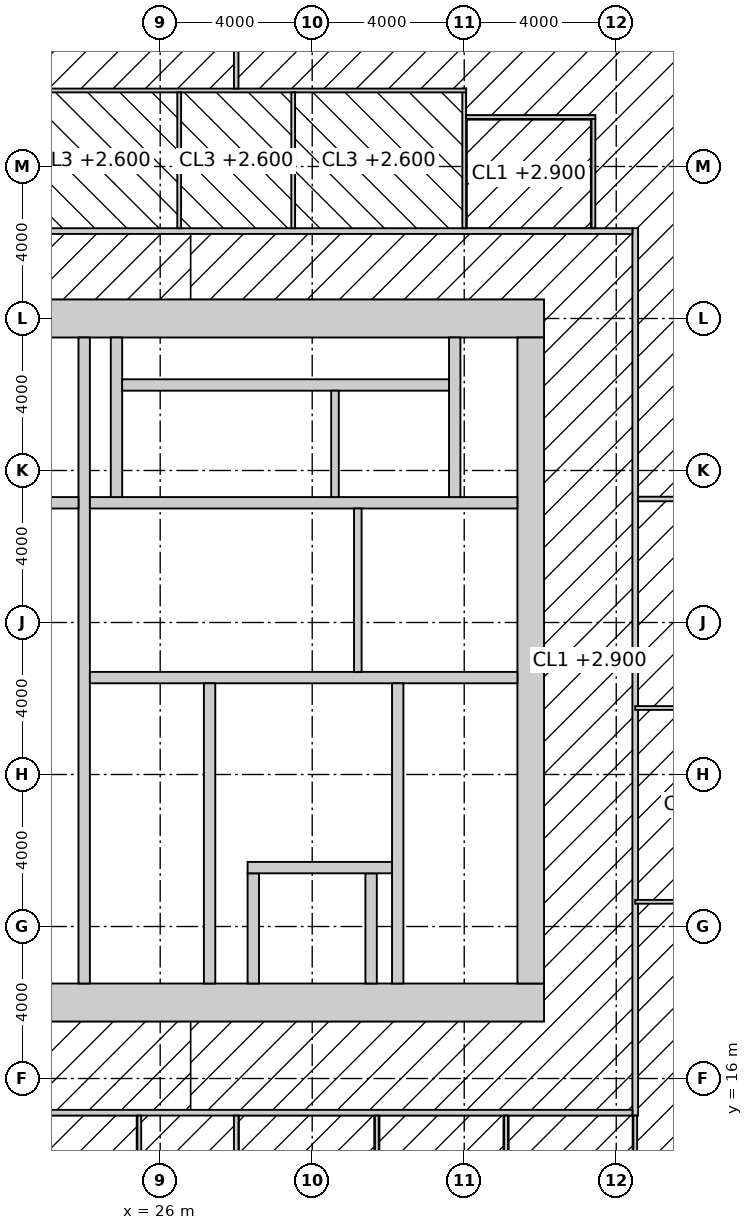
"""IFC4 building model, lengths in metres.
Left out: names, types, materials, properties, quantities, classifications, styles, units other than length and angle.
Written with IfcOpenShell. Run it as: python <this file> out.ifc"""

import sys

from ifc_helpers import new_model, si_unit, direction, frame, frame_2d, origin, place, context, subcontext, project, spatial, rectangle, extrude, element, fill, save


model = new_model("IFC4")
c1 = context("Model", 3, precision=1e-05, world=origin(), true_north=direction((0.0, 1.0)))
c2 = subcontext(c1, "Body", "Model", "MODEL_VIEW")
j1 = project(units=[si_unit("LENGTHUNIT", "METRE"), si_unit("PLANEANGLEUNIT", "RADIAN")], contexts=[c1])
p1 = place(None, origin())
s1 = spatial("IfcSite", under=j1, at=p1, CompositionType="ELEMENT")
p2 = place(p1, origin())
s2 = spatial("IfcBuilding", under=s1, at=p2, CompositionType="ELEMENT")
p3 = place(p2, frame((0.0, 0.0, 254.2)))
s3 = spatial("IfcBuildingStorey", under=s2, at=p3, CompositionType="ELEMENT", Elevation=254.2)
p4 = place(p3, frame((18.5, 18.0, -0.15), z_axis=(0.0, 0.0, 1.0), x_axis=(1.0, 0.0, 0.0)))
e1 = element("IfcWall", 1, at=p4, inside=s3, PredefinedType="SHEAR", context=c2, shape_type="SweptSolid", body=[
    extrude(rectangle(XDim=17.6, YDim=1.0, at=frame_2d((8.8, 0.0))), origin(), (0.0, 0.0, 1.0), 4.0),
])
p5 = place(p4, frame((3.45, 0.0, 0.15)))
e2 = element("IfcOpeningElement", 2, at=p5, cuts=e1, PredefinedType="OPENING", context=c2, shape_type="SweptSolid", body=[
    extrude(rectangle(XDim=1.5, YDim=2.4, at=frame_2d((0.75, 1.2))), frame((0.0, 0.51, 0.0), z_axis=(0.0, -1.0, 0.0), x_axis=(1.0, 0.0, 0.0)), (0.0, 0.0, 1.0), 1.02),
])
p6 = place(p3, frame((18.5, 36.0, -0.15), z_axis=(0.0, 0.0, 1.0), x_axis=(1.0, 0.0, 0.0)))
e3 = element("IfcWall", 3, at=p6, inside=s3, PredefinedType="SHEAR", context=c2, shape_type="SweptSolid", body=[
    extrude(rectangle(XDim=17.6, YDim=1.0, at=frame_2d((8.8, 0.0))), origin(), (0.0, 0.0, 1.0), 4.0),
])
p7 = place(p3, frame((35.75, 18.5, -0.15), z_axis=(0.0, 0.0, 1.0), x_axis=(0.0, 1.0, 0.0)))
e4 = element("IfcWall", 4, at=p7, inside=s3, PredefinedType="SHEAR", context=c2, shape_type="SweptSolid", body=[
    extrude(rectangle(XDim=17.0, YDim=0.7, at=frame_2d((8.5, 0.0))), origin(), (0.0, 0.0, 1.0), 4.0),
])
p8 = place(p7, frame((9.85, 0.0, 0.15)))
e5 = element("IfcOpeningElement", 5, at=p8, cuts=e4, PredefinedType="OPENING", context=c2, shape_type="SweptSolid", body=[
    extrude(rectangle(XDim=1.0, YDim=2.2, at=frame_2d((0.5, 1.1))), frame((0.0, 0.36, 0.0), z_axis=(0.0, -1.0, 0.0), x_axis=(1.0, 0.0, 0.0)), (0.0, 0.0, 1.0), 0.72),
])
p9 = place(p3, frame((24.0, 18.5, -0.15), z_axis=(0.0, 0.0, 1.0), x_axis=(0.0, 1.0, 0.0)))
e6 = element("IfcWall", 6, at=p9, inside=s3, PredefinedType="SHEAR", context=c2, shape_type="SweptSolid", body=[
    extrude(rectangle(XDim=17.0, YDim=0.3, at=frame_2d((8.5, 0.0))), origin(), (0.0, 0.0, 1.0), 4.0),
])
p10 = place(p9, frame((9.6, 0.0, 0.15)))
e7 = element("IfcOpeningElement", 7, at=p10, cuts=e6, PredefinedType="OPENING", context=c2, shape_type="SweptSolid", body=[
    extrude(rectangle(XDim=1.5, YDim=2.4, at=frame_2d((0.75, 1.2))), frame((0.0, 0.16, 0.0), z_axis=(0.0, -1.0, 0.0), x_axis=(1.0, 0.0, 0.0)), (0.0, 0.0, 1.0), 0.32),
])
p11 = place(p3, frame((24.15, 26.55, -0.15), z_axis=(0.0, 0.0, 1.0), x_axis=(1.0, 0.0, 0.0)))
e8 = element("IfcWall", 8, at=p11, inside=s3, PredefinedType="SHEAR", context=c2, shape_type="SweptSolid", body=[
    extrude(rectangle(XDim=11.25, YDim=0.3, at=frame_2d((5.625, 0.0))), origin(), (0.0, 0.0, 1.0), 4.0),
])
p12 = place(p11, frame((9.25, 0.0, 0.15)))
e9 = element("IfcOpeningElement", 9, at=p12, cuts=e8, PredefinedType="OPENING", context=c2, shape_type="SweptSolid", body=[
    extrude(rectangle(XDim=1.0, YDim=2.2, at=frame_2d((0.5, 1.1))), frame((0.0, 0.16, 0.0), z_axis=(0.0, -1.0, 0.0), x_axis=(1.0, 0.0, 0.0)), (0.0, 0.0, 1.0), 0.32),
])
p13 = place(p11, frame((4.9, 0.0, 0.15)))
e10 = element("IfcOpeningElement", 10, at=p13, cuts=e8, PredefinedType="OPENING", context=c2, shape_type="SweptSolid", body=[
    extrude(rectangle(XDim=1.5, YDim=2.4, at=frame_2d((0.75, 1.2))), frame((0.0, 0.16, 0.0), z_axis=(0.0, -1.0, 0.0), x_axis=(1.0, 0.0, 0.0)), (0.0, 0.0, 1.0), 0.32),
])
p14 = place(p3, frame((27.3, 18.5, -0.15), z_axis=(0.0, 0.0, 1.0), x_axis=(0.0, 1.0, 0.0)))
e11 = element("IfcWall", 11, at=p14, inside=s3, PredefinedType="SHEAR", context=c2, shape_type="SweptSolid", body=[
    extrude(rectangle(XDim=7.9, YDim=0.3, at=frame_2d((3.95, 0.0))), origin(), (0.0, 0.0, 1.0), 4.0),
])
p15 = place(p14, frame((6.4, 0.0, 0.15)))
e12 = element("IfcOpeningElement", 12, at=p15, cuts=e11, PredefinedType="OPENING", context=c2, shape_type="SweptSolid", body=[
    extrude(rectangle(XDim=1.0, YDim=2.2, at=frame_2d((0.5, 1.1))), frame((0.0, 0.16, 0.0), z_axis=(0.0, -1.0, 0.0), x_axis=(1.0, 0.0, 0.0)), (0.0, 0.0, 1.0), 0.32),
])
p16 = place(p3, frame((32.25, 18.5, -0.15), z_axis=(0.0, 0.0, 1.0), x_axis=(0.0, 1.0, 0.0)))
e13 = element("IfcWall", 13, at=p16, inside=s3, PredefinedType="SHEAR", context=c2, shape_type="SweptSolid", body=[
    extrude(rectangle(XDim=7.9, YDim=0.3, at=frame_2d((3.95, 0.0))), origin(), (0.0, 0.0, 1.0), 4.0),
])
for number, where, z_axis, x_axis in (
    (14, (28.45, 18.5, -0.15), (0.0, 0.0, 1.0), (0.0, 1.0, 0.0)),
    (15, (31.55, 18.5, -0.15), (0.0, 0.0, 1.0), (0.0, 1.0, 0.0)),
):
    element("IfcWall", number, at=place(p3, frame(where, z_axis=z_axis, x_axis=x_axis)), inside=s3, PredefinedType="SHEAR", context=c2, shape_type="SweptSolid", body=[
        extrude(rectangle(XDim=2.9, YDim=0.3, at=frame_2d((1.45, 0.0))), origin(), (0.0, 0.0, 1.0), 4.0),
    ])
p17 = place(p3, frame((28.3, 21.55, -0.15), z_axis=(0.0, 0.0, 1.0), x_axis=(1.0, 0.0, 0.0)))
e16 = element("IfcWall", 16, at=p17, inside=s3, PredefinedType="SHEAR", context=c2, shape_type="SweptSolid", body=[
    extrude(rectangle(XDim=3.8, YDim=0.3, at=frame_2d((1.9, 0.0))), origin(), (0.0, 0.0, 1.0), 4.0),
])
p18 = place(p17, frame((1.05, 0.0, 0.15)))
e17 = element("IfcOpeningElement", 17, at=p18, cuts=e16, PredefinedType="OPENING", context=c2, shape_type="SweptSolid", body=[
    extrude(rectangle(XDim=1.3, YDim=2.4, at=frame_2d((0.65, 1.2))), frame((0.0, 0.16, 0.0), z_axis=(0.0, -1.0, 0.0), x_axis=(1.0, 0.0, 0.0)), (0.0, 0.0, 1.0), 0.32),
])
p19 = place(p3, frame((24.15, 31.15, -0.15), z_axis=(0.0, 0.0, 1.0), x_axis=(1.0, 0.0, 0.0)))
e18 = element("IfcWall", 18, at=p19, inside=s3, PredefinedType="SHEAR", context=c2, shape_type="SweptSolid", body=[
    extrude(rectangle(XDim=11.25, YDim=0.3, at=frame_2d((5.625, 0.0))), origin(), (0.0, 0.0, 1.0), 4.0),
])
p20 = place(p19, frame((3.15, 0.0, 0.15)))
e19 = element("IfcOpeningElement", 19, at=p20, cuts=e18, PredefinedType="OPENING", context=c2, shape_type="SweptSolid", body=[
    extrude(rectangle(XDim=1.0, YDim=2.2, at=frame_2d((0.5, 1.1))), frame((0.0, 0.16, 0.0), z_axis=(0.0, -1.0, 0.0), x_axis=(1.0, 0.0, 0.0)), (0.0, 0.0, 1.0), 0.32),
])
p21 = place(p19, frame((7.25, 0.0, 0.15)))
e20 = element("IfcOpeningElement", 20, at=p21, cuts=e18, PredefinedType="OPENING", context=c2, shape_type="SweptSolid", body=[
    extrude(rectangle(XDim=1.4, YDim=2.4, at=frame_2d((0.7, 1.2))), frame((0.0, 0.16, 0.0), z_axis=(0.0, -1.0, 0.0), x_axis=(1.0, 0.0, 0.0)), (0.0, 0.0, 1.0), 0.32),
])
p22 = place(p3, frame((18.5, 31.15, -0.15), z_axis=(0.0, 0.0, 1.0), x_axis=(1.0, 0.0, 0.0)))
e21 = element("IfcWall", 21, at=p22, inside=s3, PredefinedType="SHEAR", context=c2, shape_type="SweptSolid", body=[
    extrude(rectangle(XDim=5.35, YDim=0.3, at=frame_2d((2.675, 0.0))), origin(), (0.0, 0.0, 1.0), 4.0),
])
p23 = place(p22, frame((3.4, 0.0, 0.15)))
e22 = element("IfcOpeningElement", 22, at=p23, cuts=e21, PredefinedType="OPENING", context=c2, shape_type="SweptSolid", body=[
    extrude(rectangle(XDim=1.0, YDim=2.2, at=frame_2d((0.5, 1.1))), frame((0.0, 0.16, 0.0), z_axis=(0.0, -1.0, 0.0), x_axis=(1.0, 0.0, 0.0)), (0.0, 0.0, 1.0), 0.32),
])
for number, where, z_axis, x_axis in (
    (23, (24.85, 31.3, -0.15), (0.0, 0.0, 1.0), (0.0, 1.0, 0.0)),
    (24, (33.75, 31.3, -0.15), (0.0, 0.0, 1.0), (0.0, 1.0, 0.0)),
):
    element("IfcWall", number, at=place(p3, frame(where, z_axis=z_axis, x_axis=x_axis)), inside=s3, PredefinedType="SHEAR", context=c2, shape_type="SweptSolid", body=[
        extrude(rectangle(XDim=4.2, YDim=0.3, at=frame_2d((2.1, 0.0))), origin(), (0.0, 0.0, 1.0), 4.0),
    ])
p24 = place(p3, frame((25.0, 34.25, -0.15), z_axis=(0.0, 0.0, 1.0), x_axis=(1.0, 0.0, 0.0)))
e25 = element("IfcWall", 25, at=p24, inside=s3, PredefinedType="SHEAR", context=c2, shape_type="SweptSolid", body=[
    extrude(rectangle(XDim=8.6, YDim=0.3, at=frame_2d((4.3, 0.0))), origin(), (0.0, 0.0, 1.0), 4.0),
])
p25 = place(p3, frame((30.6, 31.3, -0.15), z_axis=(0.0, 0.0, 1.0), x_axis=(0.0, 1.0, 0.0)))
e26 = element("IfcWall", 26, at=p25, inside=s3, PredefinedType="SOLIDWALL", context=c2, shape_type="SweptSolid", body=[
    extrude(rectangle(XDim=2.8, YDim=0.2, at=frame_2d((1.4, 0.0))), origin(), (0.0, 0.0, 1.0), 4.0),
])
p26 = place(p3, frame((31.2, 26.7, 0.0), z_axis=(0.0, 0.0, 1.0), x_axis=(0.0, 1.0, 0.0)))
e27 = element("IfcWall", 27, at=p26, inside=s3, PredefinedType="SOLIDWALL", context=c2, shape_type="SweptSolid", body=[
    extrude(rectangle(XDim=4.3, YDim=0.2, at=frame_2d((2.15, 0.0))), origin(), (0.0, 0.0, 1.0), 3.85),
])
p27 = place(p3, frame((38.5, 15.025, 0.0), z_axis=(0.0, 0.0, 1.0), x_axis=(0.0, 1.0, 0.0)))
e28 = element("IfcWall", 28, at=p27, inside=s3, PredefinedType="PARTITIONING", context=c2, shape_type="SweptSolid", body=[
    extrude(rectangle(XDim=23.35, YDim=0.15, at=frame_2d((11.675, 0.0))), origin(), (0.0, 0.0, 1.0), 3.85),
])
p28 = place(p27, frame((7.275, 0.0, 0.0)))
e29 = element("IfcOpeningElement", 29, at=p28, cuts=e28, PredefinedType="OPENING", context=c2, shape_type="SweptSolid", body=[
    extrude(rectangle(XDim=1.8, YDim=2.4, at=frame_2d((0.9, 1.2))), frame((0.0, 0.085, 0.0), z_axis=(0.0, -1.0, 0.0), x_axis=(1.0, 0.0, 0.0)), (0.0, 0.0, 1.0), 0.17),
])
p29 = place(p27, frame((18.826, 0.0, 0.0)))
e30 = element("IfcOpeningElement", 30, at=p29, cuts=e28, PredefinedType="OPENING", context=c2, shape_type="SweptSolid", body=[
    extrude(rectangle(XDim=1.8, YDim=2.4, at=frame_2d((0.9, 1.2))), frame((0.0, 0.085, 0.0), z_axis=(0.0, -1.0, 0.0), x_axis=(1.0, 0.0, 0.0)), (0.0, 0.0, 1.0), 0.17),
])
p30 = place(p3, frame((15.775, 15.1, 0.0), z_axis=(0.0, 0.0, 1.0), x_axis=(1.0, 0.0, 0.0)))
e31 = element("IfcWall", 31, at=p30, inside=s3, PredefinedType="PARTITIONING", context=c2, shape_type="SweptSolid", body=[
    extrude(rectangle(XDim=22.65, YDim=0.15, at=frame_2d((11.325, 0.0))), origin(), (0.0, 0.0, 1.0), 3.85),
])
p31 = place(p3, frame((15.775, 38.3, 0.0), z_axis=(0.0, 0.0, 1.0), x_axis=(1.0, 0.0, 0.0)))
e32 = element("IfcWall", 32, at=p31, inside=s3, PredefinedType="PARTITIONING", context=c2, shape_type="SweptSolid", body=[
    extrude(rectangle(XDim=22.65, YDim=0.15, at=frame_2d((11.325, 0.0))), origin(), (0.0, 0.0, 1.0), 3.85),
])
p32 = place(p31, frame((7.975, 0.0, 0.0)))
e33 = element("IfcOpeningElement", 33, at=p32, cuts=e32, PredefinedType="OPENING", context=c2, shape_type="SweptSolid", body=[
    extrude(rectangle(XDim=0.9, YDim=2.1, at=frame_2d((0.45, 1.05))), frame((0.0, 0.085, 0.0), z_axis=(0.0, -1.0, 0.0), x_axis=(1.0, 0.0, 0.0)), (0.0, 0.0, 1.0), 0.17),
])
p33 = place(p31, frame((11.725, 0.0, 0.0)))
e34 = element("IfcOpeningElement", 34, at=p33, cuts=e32, PredefinedType="OPENING", context=c2, shape_type="SweptSolid", body=[
    extrude(rectangle(XDim=1.0, YDim=2.1, at=frame_2d((0.5, 1.05))), frame((0.0, 0.085, 0.0), z_axis=(0.0, -1.0, 0.0), x_axis=(1.0, 0.0, 0.0)), (0.0, 0.0, 1.0), 0.17),
])
p34 = place(p31, frame((15.575, 0.0, 0.0)))
e35 = element("IfcOpeningElement", 35, at=p34, cuts=e32, PredefinedType="OPENING", context=c2, shape_type="SweptSolid", body=[
    extrude(rectangle(XDim=0.9, YDim=2.1, at=frame_2d((0.45, 1.05))), frame((0.0, 0.085, 0.0), z_axis=(0.0, -1.0, 0.0), x_axis=(1.0, 0.0, 0.0)), (0.0, 0.0, 1.0), 0.17),
])
p35 = place(p3, frame((34.0, 38.375, 0.0), z_axis=(0.0, 0.0, 1.0), x_axis=(0.0, 1.0, 0.0)))
e36 = element("IfcWall", 36, at=p35, inside=s3, PredefinedType="PARTITIONING", context=c2, shape_type="SweptSolid", body=[
    extrude(rectangle(XDim=3.675, YDim=0.1, at=frame_2d((1.837, 0.0))), origin(), (0.0, 0.0, 1.0), 2.95),
])
p36 = place(p3, frame((21.95, 42.0, 0.0), z_axis=(0.0, 0.0, 1.0), x_axis=(1.0, 0.0, 0.0)))
e37 = element("IfcWall", 37, at=p36, inside=s3, PredefinedType="PARTITIONING", context=c2, shape_type="SweptSolid", body=[
    extrude(rectangle(XDim=12.1, YDim=0.1, at=frame_2d((6.05, 0.0))), origin(), (0.0, 0.0, 1.0), 3.85),
])
for number, where, z_axis, x_axis in (
    (38, (26.5, 38.375, 0.0), (0.0, 0.0, 1.0), (0.0, 1.0, 0.0)),
    (39, (29.5, 38.375, 0.0), (0.0, 0.0, 1.0), (0.0, 1.0, 0.0)),
):
    element("IfcWall", number, at=place(p3, frame(where, z_axis=z_axis, x_axis=x_axis)), inside=s3, PredefinedType="PARTITIONING", context=c2, shape_type="SweptSolid", body=[
        extrude(rectangle(XDim=3.575, YDim=0.1, at=frame_2d((1.788, 0.0))), origin(), (0.0, 0.0, 1.0), 3.85),
    ])
p37 = place(p3, frame((28.0, 4.3, 0.0), z_axis=(0.0, 0.0, 1.0), x_axis=(0.0, 1.0, 0.0)))
e40 = element("IfcWall", 40, at=p37, inside=s3, PredefinedType="PARTITIONING", context=c2, shape_type="SweptSolid", body=[
    extrude(rectangle(XDim=10.725, YDim=0.12, at=frame_2d((5.362, 0.0))), origin(), (0.0, 0.0, 1.0), 3.85),
])
p38 = place(p3, frame((28.0, 42.05, 0.0), z_axis=(0.0, 0.0, 1.0), x_axis=(0.0, 1.0, 0.0)))
e41 = element("IfcWall", 41, at=p38, inside=s3, PredefinedType="PARTITIONING", context=c2, shape_type="SweptSolid", body=[
    extrude(rectangle(XDim=1.65, YDim=0.12, at=frame_2d((0.825, 0.0))), origin(), (0.0, 0.0, 1.0), 3.85),
])
p39 = place(p3, frame((38.575, 31.25, 0.0), z_axis=(0.0, 0.0, 1.0), x_axis=(1.0, 0.0, 0.0)))
e42 = element("IfcWall", 42, at=p39, inside=s3, PredefinedType="PARTITIONING", context=c2, shape_type="SweptSolid", body=[
    extrude(rectangle(XDim=11.125, YDim=0.12, at=frame_2d((5.562, 0.0))), origin(), (0.0, 0.0, 1.0), 3.85),
])
p40 = place(p3, frame((34.05, 41.3, 0.0), z_axis=(0.0, 0.0, 1.0), x_axis=(1.0, 0.0, 0.0)))
e43 = element("IfcWall", 43, at=p40, inside=s3, PredefinedType="PARTITIONING", context=c2, shape_type="SweptSolid", body=[
    extrude(rectangle(XDim=3.4, YDim=0.1, at=frame_2d((1.7, 0.0))), origin(), (0.0, 0.0, 1.0), 3.85),
])
p41 = place(p40, frame((1.15, 0.0, 0.0)))
e44 = element("IfcOpeningElement", 44, at=p41, cuts=e43, PredefinedType="OPENING", context=c2, shape_type="SweptSolid", body=[
    extrude(rectangle(XDim=1.0, YDim=2.2, at=frame_2d((0.5, 1.1))), frame((0.0, 0.06, 0.0), z_axis=(0.0, -1.0, 0.0), x_axis=(1.0, 0.0, 0.0)), (0.0, 0.0, 1.0), 0.12),
])
for number, where, z_axis, x_axis in (
    (45, (25.45, 11.55, 0.0), (0.0, 0.0, 1.0), (0.0, 1.0, 0.0)),
    (46, (31.701, 11.55, 0.0), (0.0, 0.0, 1.0), (0.0, 1.0, 0.0)),
    (47, (35.101, 11.55, 0.0), (0.0, 0.0, 1.0), (0.0, 1.0, 0.0)),
):
    element("IfcWall", number, at=place(p3, frame(where, z_axis=z_axis, x_axis=x_axis)), inside=s3, PredefinedType="PARTITIONING", context=c2, shape_type="SweptSolid", body=[
        extrude(rectangle(XDim=3.475, YDim=0.1, at=frame_2d((1.737, 0.0))), origin(), (0.0, 0.0, 1.0), 3.85),
    ])
p42 = place(p3, frame((37.4, 38.375, 0.0), z_axis=(0.0, 0.0, 1.0), x_axis=(0.0, 1.0, 0.0)))
e48 = element("IfcWall", 48, at=p42, inside=s3, PredefinedType="PARTITIONING", context=c2, shape_type="SweptSolid", body=[
    extrude(rectangle(XDim=2.875, YDim=0.1, at=frame_2d((1.438, 0.0))), origin(), (0.0, 0.0, 1.0), 3.85),
])
p43 = place(p3, frame((38.5, 11.55, 0.0), z_axis=(0.0, 0.0, 1.0), x_axis=(0.0, 1.0, 0.0)))
e49 = element("IfcWall", 49, at=p43, inside=s3, PredefinedType="PARTITIONING", context=c2, shape_type="SweptSolid", body=[
    extrude(rectangle(XDim=3.475, YDim=0.1, at=frame_2d((1.737, 0.0))), origin(), (0.0, 0.0, 1.0), 3.85),
])
for number, where, z_axis, x_axis in (
    (50, (38.5, 20.65, 0.0), (0.0, 0.0, 1.0), (1.0, 0.0, 0.0)),
    (51, (43.0, 25.75, 0.0), (0.0, 0.0, 1.0), (-1.0, 0.0, 0.0)),
):
    element("IfcWall", number, at=place(p3, frame(where, z_axis=z_axis, x_axis=x_axis)), inside=s3, PredefinedType="PARTITIONING", context=c2, shape_type="SweptSolid", body=[
        extrude(rectangle(XDim=4.5, YDim=0.1, at=frame_2d((2.25, 0.0))), origin(), (0.0, 0.0, 1.0), 3.85),
    ])
p44 = place(p15, origin())
e52 = element("IfcDoor", 52, at=p44, inside=s3, OperationType="SINGLE_SWING_RIGHT", PredefinedType="DOOR", context=c2, shape_type="SweptSolid", body=[
    extrude(rectangle(XDim=1.0, YDim=2.2, at=frame_2d((0.5, 1.1))), frame((0.0, 0.025, 0.0), z_axis=(0.0, -1.0, 0.0), x_axis=(1.0, 0.0, 0.0)), (0.0, 0.0, 1.0), 0.05),
])
fill(e12, e52)
p45 = place(p12, frame((1.0, 0.0, 0.0), z_axis=(0.0, 0.0, 1.0), x_axis=(-1.0, 0.0, 0.0)))
e53 = element("IfcDoor", 53, at=p45, inside=s3, OperationType="SINGLE_SWING_RIGHT", PredefinedType="DOOR", context=c2, shape_type="SweptSolid", body=[
    extrude(rectangle(XDim=1.0, YDim=2.2, at=frame_2d((0.5, 1.1))), frame((0.0, 0.025, 0.0), z_axis=(0.0, -1.0, 0.0), x_axis=(1.0, 0.0, 0.0)), (0.0, 0.0, 1.0), 0.05),
])
fill(e9, e53)
p46 = place(p8, origin())
e54 = element("IfcDoor", 54, at=p46, inside=s3, OperationType="SINGLE_SWING_RIGHT", PredefinedType="DOOR", context=c2, shape_type="SweptSolid", body=[
    extrude(rectangle(XDim=1.0, YDim=2.2, at=frame_2d((0.5, 1.1))), frame((0.0, 0.025, 0.0), z_axis=(0.0, -1.0, 0.0), x_axis=(1.0, 0.0, 0.0)), (0.0, 0.0, 1.0), 0.05),
])
fill(e5, e54)
p47 = place(p13, origin())
e55 = element("IfcDoor", 55, at=p47, inside=s3, OperationType="DOUBLE_DOOR_DOUBLE_SWING", PredefinedType="DOOR", context=c2, shape_type="SweptSolid", body=[
    extrude(rectangle(XDim=1.5, YDim=2.4, at=frame_2d((0.75, 1.2))), frame((0.0, 0.025, 0.0), z_axis=(0.0, -1.0, 0.0), x_axis=(1.0, 0.0, 0.0)), (0.0, 0.0, 1.0), 0.05),
])
fill(e10, e55)
p48 = place(p10, origin())
e56 = element("IfcDoor", 56, at=p48, inside=s3, OperationType="DOUBLE_DOOR_DOUBLE_SWING", PredefinedType="DOOR", context=c2, shape_type="SweptSolid", body=[
    extrude(rectangle(XDim=1.5, YDim=2.4, at=frame_2d((0.75, 1.2))), frame((0.0, 0.025, 0.0), z_axis=(0.0, -1.0, 0.0), x_axis=(1.0, 0.0, 0.0)), (0.0, 0.0, 1.0), 0.05),
])
fill(e7, e56)
p49 = place(p20, origin())
e57 = element("IfcDoor", 57, at=p49, inside=s3, OperationType="SINGLE_SWING_LEFT", PredefinedType="DOOR", context=c2, shape_type="SweptSolid", body=[
    extrude(rectangle(XDim=1.0, YDim=2.2, at=frame_2d((0.5, 1.1))), frame((0.0, 0.025, 0.0), z_axis=(0.0, -1.0, 0.0), x_axis=(1.0, 0.0, 0.0)), (0.0, 0.0, 1.0), 0.05),
])
fill(e19, e57)
p50 = place(p5, origin())
e58 = element("IfcDoor", 58, at=p50, inside=s3, OperationType="DOUBLE_DOOR_DOUBLE_SWING", PredefinedType="DOOR", context=c2, shape_type="SweptSolid", body=[
    extrude(rectangle(XDim=1.5, YDim=2.4, at=frame_2d((0.75, 1.2))), frame((0.0, 0.025, 0.0), z_axis=(0.0, -1.0, 0.0), x_axis=(1.0, 0.0, 0.0)), (0.0, 0.0, 1.0), 0.05),
])
fill(e2, e58)
p51 = place(p32, origin())
e59 = element("IfcDoor", 59, at=p51, inside=s3, OperationType="SINGLE_SWING_LEFT", PredefinedType="DOOR", context=c2, shape_type="SweptSolid", body=[
    extrude(rectangle(XDim=0.9, YDim=2.1, at=frame_2d((0.45, 1.05))), frame((0.0, 0.025, 0.0), z_axis=(0.0, -1.0, 0.0), x_axis=(1.0, 0.0, 0.0)), (0.0, 0.0, 1.0), 0.05),
])
fill(e33, e59)
p52 = place(p33, origin())
e60 = element("IfcDoor", 60, at=p52, inside=s3, OperationType="SLIDING_TO_LEFT", PredefinedType="DOOR", context=c2, shape_type="SweptSolid", body=[
    extrude(rectangle(XDim=1.0, YDim=2.1, at=frame_2d((0.5, 1.05))), frame((0.0, 0.025, 0.0), z_axis=(0.0, -1.0, 0.0), x_axis=(1.0, 0.0, 0.0)), (0.0, 0.0, 1.0), 0.05),
])
fill(e34, e60)
p53 = place(p34, origin())
e61 = element("IfcDoor", 61, at=p53, inside=s3, OperationType="SINGLE_SWING_LEFT", PredefinedType="DOOR", context=c2, shape_type="SweptSolid", body=[
    extrude(rectangle(XDim=0.9, YDim=2.1, at=frame_2d((0.45, 1.05))), frame((0.0, 0.025, 0.0), z_axis=(0.0, -1.0, 0.0), x_axis=(1.0, 0.0, 0.0)), (0.0, 0.0, 1.0), 0.05),
])
fill(e35, e61)
p54 = place(p28, origin())
e62 = element("IfcDoor", 62, at=p54, inside=s3, OperationType="DOUBLE_DOOR_DOUBLE_SWING", PredefinedType="DOOR", context=c2, shape_type="SweptSolid", body=[
    extrude(rectangle(XDim=1.8, YDim=2.4, at=frame_2d((0.9, 1.2))), frame((0.0, 0.025, 0.0), z_axis=(0.0, -1.0, 0.0), x_axis=(1.0, 0.0, 0.0)), (0.0, 0.0, 1.0), 0.05),
])
fill(e29, e62)
p55 = place(p29, origin())
e63 = element("IfcDoor", 63, at=p55, inside=s3, OperationType="DOUBLE_DOOR_DOUBLE_SWING", PredefinedType="DOOR", context=c2, shape_type="SweptSolid", body=[
    extrude(rectangle(XDim=1.8, YDim=2.4, at=frame_2d((0.9, 1.2))), frame((0.0, 0.025, 0.0), z_axis=(0.0, -1.0, 0.0), x_axis=(1.0, 0.0, 0.0)), (0.0, 0.0, 1.0), 0.05),
])
fill(e30, e63)
p56 = place(p41, origin())
e64 = element("IfcDoor", 64, at=p56, inside=s3, OperationType="SINGLE_SWING_LEFT", PredefinedType="DOOR", context=c2, shape_type="SweptSolid", body=[
    extrude(rectangle(XDim=1.0, YDim=2.2, at=frame_2d((0.5, 1.1))), frame((0.0, 0.025, 0.0), z_axis=(0.0, -1.0, 0.0), x_axis=(1.0, 0.0, 0.0)), (0.0, 0.0, 1.0), 0.05),
])
fill(e44, e64)
p57 = place(p18, origin())
e65 = element("IfcDoor", 65, at=p57, inside=s3, OperationType="DOUBLE_DOOR_SLIDING", PredefinedType="DOOR", context=c2, shape_type="SweptSolid", body=[
    extrude(rectangle(XDim=1.3, YDim=2.4, at=frame_2d((0.65, 1.2))), frame((0.0, 0.025, 0.0), z_axis=(0.0, -1.0, 0.0), x_axis=(1.0, 0.0, 0.0)), (0.0, 0.0, 1.0), 0.05),
])
fill(e17, e65)
p58 = place(p21, origin())
e66 = element("IfcDoor", 66, at=p58, inside=s3, OperationType="DOUBLE_DOOR_SLIDING", PredefinedType="DOOR", context=c2, shape_type="SweptSolid", body=[
    extrude(rectangle(XDim=1.4, YDim=2.4, at=frame_2d((0.7, 1.2))), frame((0.0, 0.025, 0.0), z_axis=(0.0, -1.0, 0.0), x_axis=(1.0, 0.0, 0.0)), (0.0, 0.0, 1.0), 0.05),
])
fill(e20, e66)
save(model, sys.argv[1])
